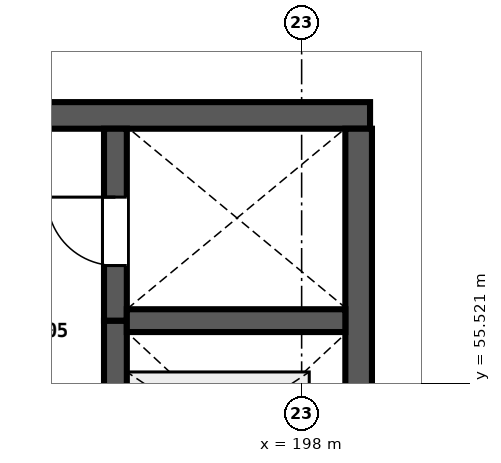
"""IFC4 building model, lengths in metres.
Left out: names, types, materials, properties, quantities, classifications, styles, units other than length and angle.
Written with IfcOpenShell. Run it as: python <this file> out.ifc"""

import sys

from ifc_helpers import new_model, si_unit, direction, frame, frame_2d, origin, place, context, subcontext, project, spatial, rectangle, extrude, element, fill, save


model = new_model("IFC4")
c1 = context("Model", 3, precision=1e-05, world=origin(), true_north=direction((0.0, 1.0)))
c2 = subcontext(c1, "Body", "Model", "MODEL_VIEW")
j1 = project(units=[si_unit("LENGTHUNIT", "METRE"), si_unit("PLANEANGLEUNIT", "RADIAN")], contexts=[c1])
p1 = place(None, origin())
s1 = spatial("IfcSite", under=j1, at=p1, CompositionType="ELEMENT")
p2 = place(p1, origin())
s2 = spatial("IfcBuilding", under=s1, at=p2, CompositionType="ELEMENT")
p3 = place(p2, frame((0.0, 0.0, 4.8)))
s3 = spatial("IfcBuildingStorey", under=s2, at=p3, CompositionType="ELEMENT", Elevation=4.8)
p4 = place(p3, frame((198.9, 59.05, 0.0), z_axis=(0.0, 0.0, 1.0), x_axis=(-1.0, 0.0, 0.0)))
e1 = element("IfcWall", 1, at=p4, inside=s3, PredefinedType="SHEAR", context=c2, shape_type="SweptSolid", body=[
    extrude(rectangle(XDim=18.0, YDim=0.35, at=frame_2d((9.0, 0.0))), origin(), (0.0, 0.0, 1.0), 4.52),
])
p5 = place(p4, frame((4.7, 0.0, 0.0)))
e2 = element("IfcOpeningElement", 2, at=p5, cuts=e1, PredefinedType="OPENING", context=c2, shape_type="SweptSolid", body=[
    extrude(rectangle(XDim=1.9, YDim=2.25, at=frame_2d((0.95, 1.125))), frame((0.0, 0.185, 0.0), z_axis=(0.0, -1.0, 0.0), x_axis=(1.0, 0.0, 0.0)), (0.0, 0.0, 1.0), 0.37),
])
p6 = place(p3, frame((198.75, 53.525, 0.0), z_axis=(0.0, 0.0, 1.0), x_axis=(0.0, 1.0, 0.0)))
e3 = element("IfcWall", 3, at=p6, inside=s3, PredefinedType="SHEAR", context=c2, shape_type="SweptSolid", body=[
    extrude(rectangle(XDim=5.35, YDim=0.35, at=frame_2d((2.675, 0.0))), origin(), (0.0, 0.0, 1.0), 4.52),
])
p7 = place(p3, frame((195.55, 53.525, 0.0), z_axis=(0.0, 0.0, 1.0), x_axis=(0.0, 1.0, 0.0)))
e4 = element("IfcWall", 4, at=p7, inside=s3, PredefinedType="SHEAR", context=c2, shape_type="SweptSolid", body=[
    extrude(rectangle(XDim=2.825, YDim=0.3, at=frame_2d((1.413, 0.0))), origin(), (0.0, 0.0, 1.0), 4.52),
])
p8 = place(p7, frame((0.775, 0.0, 0.0)))
e5 = element("IfcOpeningElement", 5, at=p8, cuts=e4, PredefinedType="OPENING", context=c2, shape_type="SweptSolid", body=[
    extrude(rectangle(XDim=1.1, YDim=2.1, at=frame_2d((0.55, 1.05))), frame((0.0, 0.16, 0.0), z_axis=(0.0, -1.0, 0.0), x_axis=(1.0, 0.0, 0.0)), (0.0, 0.0, 1.0), 0.32),
])
p9 = place(p3, frame((195.55, 56.35, 0.0), z_axis=(0.0, 0.0, 1.0), x_axis=(0.0, 1.0, 0.0)))
e6 = element("IfcWall", 6, at=p9, inside=s3, PredefinedType="SHEAR", context=c2, shape_type="SweptSolid", body=[
    extrude(rectangle(XDim=2.525, YDim=0.3, at=frame_2d((1.262, 0.0))), origin(), (0.0, 0.0, 1.0), 4.52),
])
p10 = place(p9, frame((0.725, 0.0, 0.0)))
e7 = element("IfcOpeningElement", 7, at=p10, cuts=e6, PredefinedType="OPENING", context=c2, shape_type="SweptSolid", body=[
    extrude(rectangle(XDim=0.9, YDim=2.1, at=frame_2d((0.45, 1.05))), frame((0.0, 0.16, 0.0), z_axis=(0.0, -1.0, 0.0), x_axis=(1.0, 0.0, 0.0)), (0.0, 0.0, 1.0), 0.32),
])
p11 = place(p3, frame((195.7, 56.35, 0.0), z_axis=(0.0, 0.0, 1.0), x_axis=(1.0, 0.0, 0.0)))
e8 = element("IfcWall", 8, at=p11, inside=s3, PredefinedType="SHEAR", context=c2, shape_type="SweptSolid", body=[
    extrude(rectangle(XDim=2.875, YDim=0.3, at=frame_2d((1.438, 0.0))), origin(), (0.0, 0.0, 1.0), 4.52),
])
p12 = place(p10, origin())
e9 = element("IfcDoor", 9, at=p12, inside=s3, OperationType="SINGLE_SWING_RIGHT", PredefinedType="DOOR", context=c2, shape_type="SweptSolid", body=[
    extrude(rectangle(XDim=0.9, YDim=2.1, at=frame_2d((0.45, 1.05))), frame((0.0, 0.025, 0.0), z_axis=(0.0, -1.0, 0.0), x_axis=(1.0, 0.0, 0.0)), (0.0, 0.0, 1.0), 0.05),
])
fill(e7, e9)
save(model, sys.argv[1])
